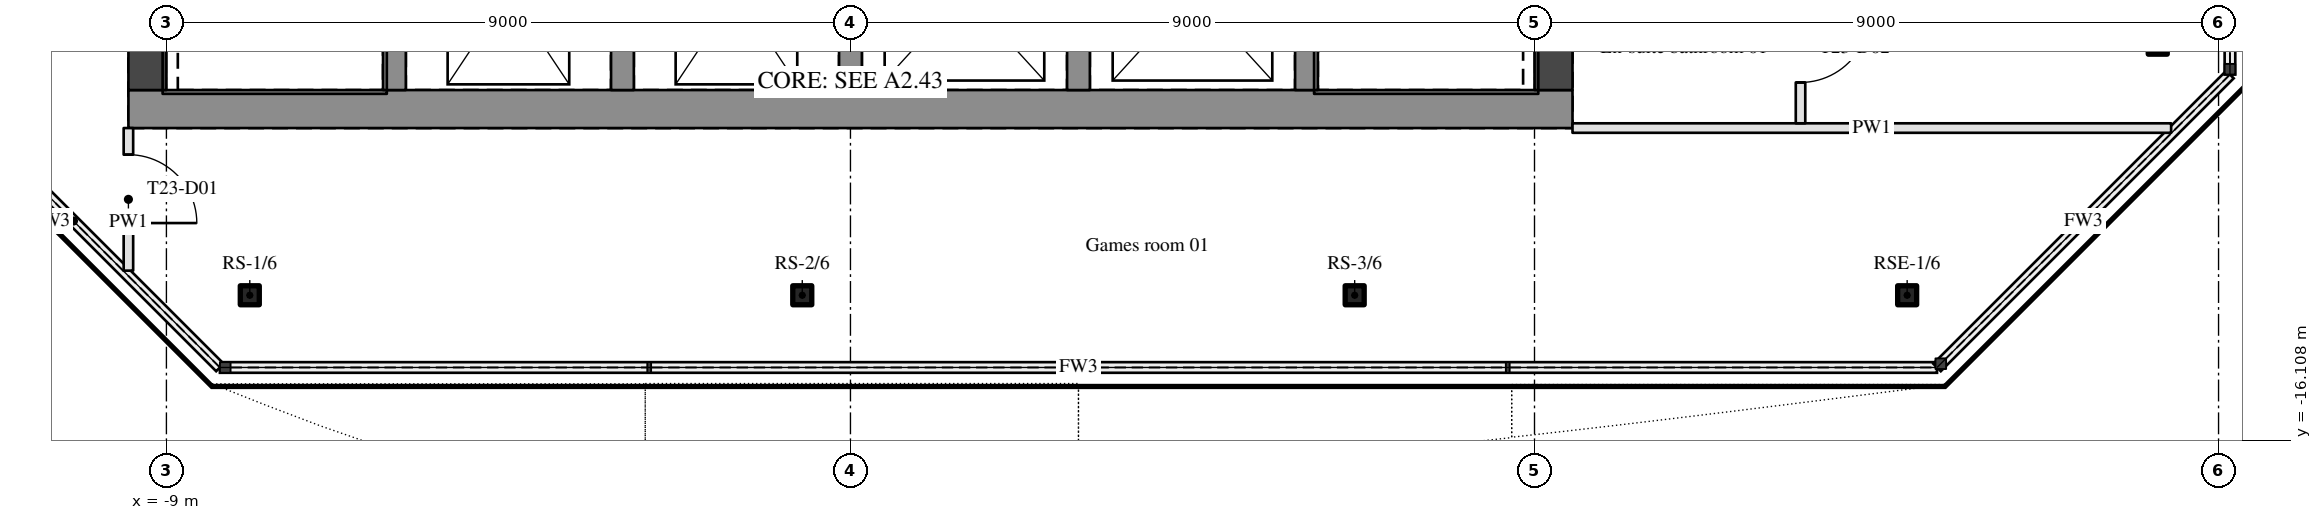
"""IFC4 building model, lengths in metres.
Left out: names, types, materials, properties, quantities, classifications, styles, units other than length and angle.
Written with IfcOpenShell. Run it as: python <this file> out.ifc"""

import sys

from ifc_helpers import new_model, si_unit, direction, frame, frame_2d, origin, origin_2d, place, context, subcontext, project, spatial, rectangle, hollow_rectangle, extrude, element, fill, save


model = new_model("IFC4")
c1 = context("Model", 3, precision=1e-05, world=origin(), true_north=direction((0.0, 1.0)))
c2 = subcontext(c1, "Body", "Model", "MODEL_VIEW")
j1 = project(units=[si_unit("LENGTHUNIT", "METRE"), si_unit("PLANEANGLEUNIT", "RADIAN")], contexts=[c1])
p1 = place(None, origin())
s1 = spatial("IfcSite", under=j1, at=p1, CompositionType="ELEMENT")
p2 = place(p1, origin())
s2 = spatial("IfcBuilding", under=s1, at=p2, CompositionType="ELEMENT")
p3 = place(p2, frame((0.0, 0.0, 294.15)))
s3 = spatial("IfcBuildingStorey", under=s2, at=p3, CompositionType="ELEMENT", Elevation=294.15)
for number, where, z_axis, x_axis in (
    (1, (-7.903, -14.2, 0.0), (0.0, 0.0, 1.0), (1.0, 0.0, 0.0)),
    (2, (-0.634, -14.2, 0.0), (0.0, 0.0, 1.0), (1.0, 0.0, 0.0)),
    (3, (6.634, -14.2, 0.0), (0.0, 0.0, 1.0), (1.0, 0.0, 0.0)),
    (4, (13.903, -14.2, 0.0), (0.0, 0.0, 1.0), (1.0, 0.0, 0.0)),
    (5, (17.2, -10.903, 0.0), (0.0, 0.0, 1.0), (1.0, 0.0, 0.0)),
):
    element("IfcColumn", number, at=place(p3, frame(where, z_axis=z_axis, x_axis=x_axis)), inside=s3, PredefinedType="COLUMN", context=c2, shape_type="SweptSolid", body=[
        extrude(hollow_rectangle(XDim=0.25, YDim=0.25, WallThickness=0.02, InnerFilletRadius=0.03, OuterFilletRadius=0.05, at=origin_2d()), origin(), (0.0, 0.0, 1.0), 3.15),
    ])
p4 = place(p3, frame((-9.5, -11.75, 0.0), z_axis=(0.0, 0.0, 1.0), x_axis=(1.0, 0.0, 0.0)))
e6 = element("IfcWall", 6, at=p4, inside=s3, PredefinedType="SHEAR", context=c2, shape_type="SweptSolid", body=[
    extrude(rectangle(XDim=19.0, YDim=0.5, at=frame_2d((9.5, 0.0))), origin(), (0.0, 0.0, 1.0), 3.15),
])
p5 = place(p3, frame((-9.25, -11.5, 0.0), z_axis=(0.0, 0.0, 1.0), x_axis=(0.0, 1.0, 0.0)))
e7 = element("IfcWall", 7, at=p5, inside=s3, PredefinedType="SHEAR", context=c2, shape_type="SweptSolid", body=[
    extrude(rectangle(XDim=11.65, YDim=0.5, at=frame_2d((5.825, 0.0))), origin(), (0.0, 0.0, 1.0), 3.15),
])
p6 = place(p5, frame((9.4, 0.0, 0.0)))
e8 = element("IfcOpeningElement", 8, at=p6, cuts=e7, PredefinedType="OPENING", context=c2, shape_type="SweptSolid", body=[
    extrude(rectangle(XDim=1.8, YDim=2.1, at=frame_2d((0.9, 1.05))), frame((0.0, 0.26, 0.0), z_axis=(0.0, -1.0, 0.0), x_axis=(1.0, 0.0, 0.0)), (0.0, 0.0, 1.0), 0.52),
])
p7 = place(p3, frame((9.25, -11.5, 0.0), z_axis=(0.0, 0.0, 1.0), x_axis=(0.0, 1.0, 0.0)))
e9 = element("IfcWall", 9, at=p7, inside=s3, PredefinedType="SHEAR", context=c2, shape_type="SweptSolid", body=[
    extrude(rectangle(XDim=11.65, YDim=0.5, at=frame_2d((5.825, 0.0))), origin(), (0.0, 0.0, 1.0), 3.15),
])
p8 = place(p3, frame((9.5, -12.0, 0.0), z_axis=(0.0, 0.0, 1.0), x_axis=(1.0, 0.0, 0.0)))
e10 = element("IfcWall", 10, at=p8, inside=s3, PredefinedType="PARTITIONING", context=c2, shape_type="SweptSolid", body=[
    extrude(rectangle(XDim=7.876, YDim=0.125, at=frame_2d((3.938, 0.0))), origin(), (0.0, 0.0, 1.0), 2.21),
])
p9 = place(p3, frame((-9.5, -12.0, 0.0), z_axis=(0.0, 0.0, 1.0), x_axis=(0.0, -1.0, 0.0)))
e11 = element("IfcWall", 11, at=p9, inside=s3, PredefinedType="PARTITIONING", context=c2, shape_type="SweptSolid", body=[
    extrude(rectangle(XDim=1.876, YDim=0.125, at=frame_2d((0.938, 0.0))), origin(), (0.0, 0.0, 1.0), 2.21),
])
p10 = place(p9, frame((0.35, 0.0, 0.0)))
e12 = element("IfcOpeningElement", 12, at=p10, cuts=e11, PredefinedType="OPENING", context=c2, shape_type="SweptSolid", body=[
    extrude(rectangle(XDim=0.9, YDim=2.1, at=frame_2d((0.45, 1.05))), frame((0.0, 0.073, 0.0), z_axis=(0.0, -1.0, 0.0), x_axis=(1.0, 0.0, 0.0)), (0.0, 0.0, 1.0), 0.145),
])
p11 = place(p3, frame((-6.0, -11.5, 0.0), z_axis=(0.0, 0.0, 1.0), x_axis=(0.0, 1.0, 0.0)))
e13 = element("IfcWall", 13, at=p11, inside=s3, PredefinedType="SHEAR", context=c2, shape_type="SweptSolid", body=[
    extrude(rectangle(XDim=6.4, YDim=0.3, at=frame_2d((3.2, 0.0))), origin(), (0.0, 0.0, 1.0), 3.15),
])
p12 = place(p11, frame((5.15, 0.0, 0.0)))
e14 = element("IfcOpeningElement", 14, at=p12, cuts=e13, PredefinedType="OPENING", context=c2, shape_type="SweptSolid", body=[
    extrude(rectangle(XDim=1.1, YDim=2.1, at=frame_2d((0.55, 1.05))), frame((0.0, 0.16, 0.0), z_axis=(0.0, -1.0, 0.0), x_axis=(1.0, 0.0, 0.0)), (0.0, 0.0, 1.0), 0.32),
])
for number, where, z_axis, x_axis in (
    (15, (-3.0, -11.5, 0.0), (0.0, 0.0, 1.0), (0.0, 1.0, 0.0)),
    (16, (0.0, -11.5, 0.0), (0.0, 0.0, 1.0), (0.0, 1.0, 0.0)),
    (17, (3.0, -11.5, 0.0), (0.0, 0.0, 1.0), (0.0, 1.0, 0.0)),
):
    element("IfcWall", number, at=place(p3, frame(where, z_axis=z_axis, x_axis=x_axis)), inside=s3, PredefinedType="SHEAR", context=c2, shape_type="SweptSolid", body=[
        extrude(rectangle(XDim=2.4, YDim=0.3, at=frame_2d((1.2, 0.0))), origin(), (0.0, 0.0, 1.0), 3.15),
    ])
p13 = place(p3, frame((6.0, -5.1, 0.0), z_axis=(0.0, 0.0, 1.0), x_axis=(0.0, -1.0, 0.0)))
e18 = element("IfcWall", 18, at=p13, inside=s3, PredefinedType="SHEAR", context=c2, shape_type="SweptSolid", body=[
    extrude(rectangle(XDim=6.4, YDim=0.3, at=frame_2d((3.2, 0.0))), origin(), (0.0, 0.0, 1.0), 3.15),
])
p14 = place(p13, frame((0.15, 0.0, 0.0)))
e19 = element("IfcOpeningElement", 19, at=p14, cuts=e18, PredefinedType="OPENING", context=c2, shape_type="SweptSolid", body=[
    extrude(rectangle(XDim=1.1, YDim=2.1, at=frame_2d((0.55, 1.05))), frame((0.0, 0.16, 0.0), z_axis=(0.0, -1.0, 0.0), x_axis=(1.0, 0.0, 0.0)), (0.0, 0.0, 1.0), 0.32),
])
p15 = place(p3, frame((12.5, -1.163, 0.0), z_axis=(0.0, 0.0, 1.0), x_axis=(0.0, -1.0, 0.0)))
e20 = element("IfcWall", 20, at=p15, inside=s3, PredefinedType="PARTITIONING", context=c2, shape_type="SweptSolid", body=[
    extrude(rectangle(XDim=10.775, YDim=0.125, at=frame_2d((5.387, 0.0))), origin(), (0.0, 0.0, 1.0), 2.21),
])
p16 = place(p15, frame((5.26, 0.0, 0.0)))
e21 = element("IfcOpeningElement", 21, at=p16, cuts=e20, PredefinedType="OPENING", context=c2, shape_type="SweptSolid", body=[
    extrude(rectangle(XDim=0.9, YDim=2.1, at=frame_2d((0.45, 1.05))), frame((0.0, 0.073, 0.0), z_axis=(0.0, -1.0, 0.0), x_axis=(1.0, 0.0, 0.0)), (0.0, 0.0, 1.0), 0.145),
])
p17 = place(p15, frame((7.438, 0.0, 0.0)))
e22 = element("IfcOpeningElement", 22, at=p17, cuts=e20, PredefinedType="OPENING", context=c2, shape_type="SweptSolid", body=[
    extrude(rectangle(XDim=1.0, YDim=2.1, at=frame_2d((0.5, 1.05))), frame((0.0, 0.073, 0.0), z_axis=(0.0, -1.0, 0.0), x_axis=(1.0, 0.0, 0.0)), (0.0, 0.0, 1.0), 0.145),
])
p18 = place(p15, frame((9.337, 0.0, 0.0)))
e23 = element("IfcOpeningElement", 23, at=p18, cuts=e20, PredefinedType="OPENING", context=c2, shape_type="SweptSolid", body=[
    extrude(rectangle(XDim=0.9, YDim=2.1, at=frame_2d((0.45, 1.05))), frame((0.0, 0.073, 0.0), z_axis=(0.0, -1.0, 0.0), x_axis=(1.0, 0.0, 0.0)), (0.0, 0.0, 1.0), 0.145),
])
p19 = place(p18, origin())
e24 = element("IfcDoor", 24, at=p19, inside=s3, OperationType="SINGLE_SWING_LEFT", PredefinedType="DOOR", context=c2, shape_type="SweptSolid", body=[
    extrude(rectangle(XDim=0.9, YDim=2.1, at=frame_2d((0.45, 1.05))), frame((0.0, 0.025, 0.0), z_axis=(0.0, -1.0, 0.0), x_axis=(1.0, 0.0, 0.0)), (0.0, 0.0, 1.0), 0.05),
])
fill(e23, e24)
p20 = place(p10, origin())
e25 = element("IfcDoor", 25, at=p20, inside=s3, OperationType="SINGLE_SWING_RIGHT", PredefinedType="DOOR", context=c2, shape_type="SweptSolid", body=[
    extrude(rectangle(XDim=0.9, YDim=2.1, at=frame_2d((0.45, 1.05))), frame((0.0, 0.025, 0.0), z_axis=(0.0, -1.0, 0.0), x_axis=(1.0, 0.0, 0.0)), (0.0, 0.0, 1.0), 0.05),
])
fill(e12, e25)
save(model, sys.argv[1])
